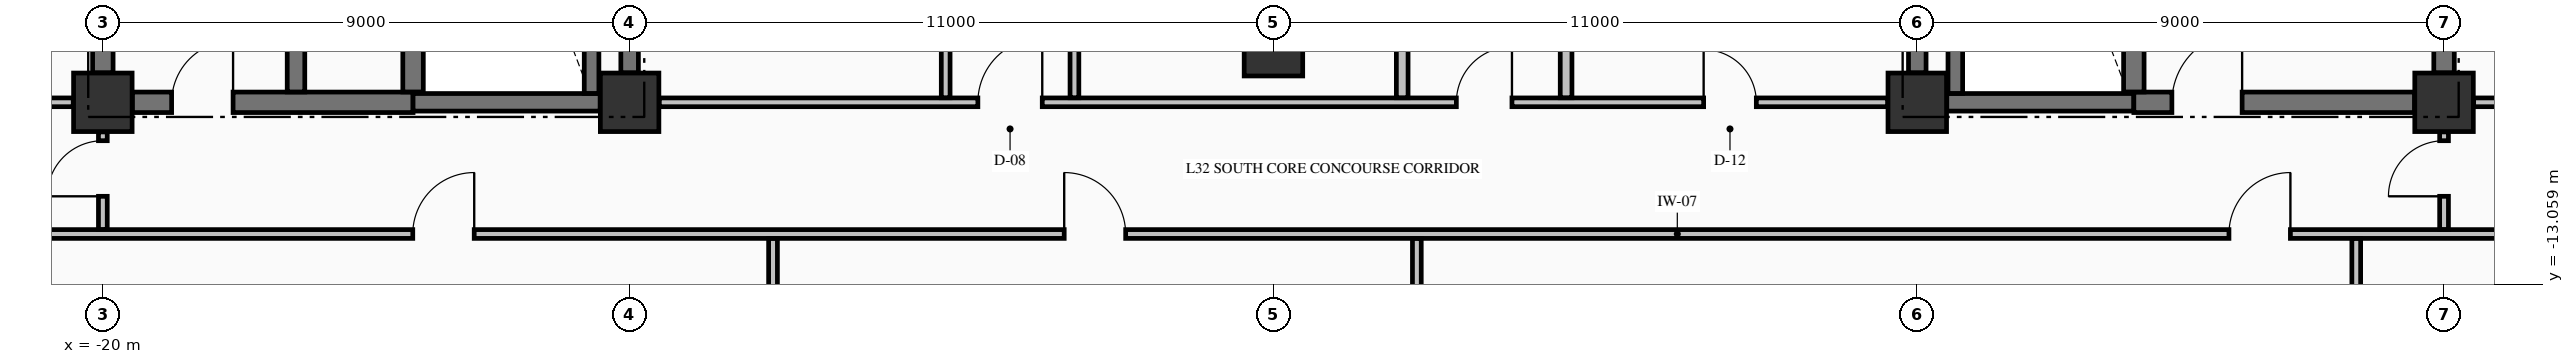
"""IFC4 building model, lengths in metres.
Left out: names, types, materials, properties, quantities, classifications, styles, units other than length and angle.
Written with IfcOpenShell. Run it as: python <this file> out.ifc"""

import sys

from ifc_helpers import new_model, si_unit, direction, frame, frame_2d, origin, origin_2d, place, context, subcontext, project, spatial, rectangle, extrude, element, fill, save


model = new_model("IFC4")
c1 = context("Model", 3, precision=1e-05, world=origin(), true_north=direction((0.0, 1.0)))
c2 = subcontext(c1, "Body", "Model", "MODEL_VIEW")
j1 = project(units=[si_unit("LENGTHUNIT", "METRE"), si_unit("PLANEANGLEUNIT", "RADIAN")], contexts=[c1])
p1 = place(None, origin())
s1 = spatial("IfcSite", under=j1, at=p1, CompositionType="ELEMENT")
p2 = place(p1, origin())
s2 = spatial("IfcBuilding", under=s1, at=p2, CompositionType="ELEMENT")
p3 = place(p2, frame((0.0, 0.0, 128.49)))
s3 = spatial("IfcBuildingStorey", under=s2, at=p3, CompositionType="ELEMENT", Elevation=128.49)
for number, where, z_axis, x_axis in (
    (1, (-20.0, -9.95, -0.25), (0.0, 0.0, 1.0), (1.0, 0.0, 0.0)),
    (2, (-11.0, -9.95, -0.25), (0.0, 0.0, 1.0), (1.0, 0.0, 0.0)),
    (3, (11.0, -9.95, -0.25), (0.0, 0.0, 1.0), (1.0, 0.0, 0.0)),
    (4, (20.0, -9.95, -0.25), (0.0, 0.0, 1.0), (1.0, 0.0, 0.0)),
    (5, (0.0, -9.0, -0.25), (0.0, 0.0, 1.0), (1.0, 0.0, 0.0)),
):
    element("IfcColumn", number, at=place(p3, frame(where, z_axis=z_axis, x_axis=x_axis)), inside=s3, PredefinedType="COLUMN", context=c2, shape_type="SweptSolid", body=[
        extrude(rectangle(XDim=1.0, YDim=1.0, at=origin_2d()), origin(), (0.0, 0.0, 1.0), 3.57),
    ])
p4 = place(p3, frame((-19.496, -9.95, 0.0), z_axis=(0.0, 0.0, 1.0), x_axis=(1.0, 0.0, 0.0)))
e6 = element("IfcWall", 6, at=p4, inside=s3, PredefinedType="SHEAR", context=c2, shape_type="SweptSolid", body=[
    extrude(rectangle(XDim=4.796, YDim=0.35, at=frame_2d((2.398, 0.0))), origin(), (0.0, 0.0, 1.0), 3.32),
])
p5 = place(p4, frame((0.671, 0.0, 0.0)))
e7 = element("IfcOpeningElement", 7, at=p5, cuts=e6, PredefinedType="OPENING", context=c2, shape_type="SweptSolid", body=[
    extrude(rectangle(XDim=1.05, YDim=2.15, at=frame_2d((0.525, 1.075))), frame((0.0, 0.185, 0.0), z_axis=(0.0, -1.0, 0.0), x_axis=(1.0, 0.0, 0.0)), (0.0, 0.0, 1.0), 0.37),
])
for number, where, z_axis, x_axis in (
    (8, (-14.7, -9.95, 0.0), (0.0, 0.0, 1.0), (1.0, 0.0, 0.0)),
    (9, (11.504, -9.95, 0.0), (0.0, 0.0, 1.0), (1.0, 0.0, 0.0)),
):
    element("IfcWall", number, at=place(p3, frame(where, z_axis=z_axis, x_axis=x_axis)), inside=s3, PredefinedType="SHEAR", context=c2, shape_type="SweptSolid", body=[
        extrude(rectangle(XDim=3.196, YDim=0.3, at=frame_2d((1.598, 0.0))), origin(), (0.0, 0.0, 1.0), 3.32),
    ])
p6 = place(p3, frame((14.7, -9.95, 0.0), z_axis=(0.0, 0.0, 1.0), x_axis=(1.0, 0.0, 0.0)))
e10 = element("IfcWall", 10, at=p6, inside=s3, PredefinedType="SHEAR", context=c2, shape_type="SweptSolid", body=[
    extrude(rectangle(XDim=4.796, YDim=0.35, at=frame_2d((2.398, 0.0))), origin(), (0.0, 0.0, 1.0), 3.32),
])
p7 = place(p6, frame((0.65, 0.0, 0.0)))
e11 = element("IfcOpeningElement", 11, at=p7, cuts=e10, PredefinedType="OPENING", context=c2, shape_type="SweptSolid", body=[
    extrude(rectangle(XDim=1.2, YDim=2.15, at=frame_2d((0.6, 1.075))), frame((0.0, 0.185, 0.0), z_axis=(0.0, -1.0, 0.0), x_axis=(1.0, 0.0, 0.0)), (0.0, 0.0, 1.0), 0.37),
])
p8 = place(p3, frame((-27.835, -12.2, 0.0), z_axis=(0.0, 0.0, 1.0), x_axis=(1.0, 0.0, 0.0)))
e12 = element("IfcWall", 12, at=p8, inside=s3, PredefinedType="PARTITIONING", context=c2, shape_type="SweptSolid", body=[
    extrude(rectangle(XDim=50.67, YDim=0.15, at=frame_2d((25.335, 0.0))), origin(), (0.0, 0.0, 1.0), 3.32),
])
p9 = place(p8, frame((13.13, 0.0, 0.0)))
e13 = element("IfcOpeningElement", 13, at=p9, cuts=e12, PredefinedType="OPENING", context=c2, shape_type="SweptSolid", body=[
    extrude(rectangle(XDim=1.05, YDim=2.15, at=frame_2d((0.525, 1.075))), frame((0.0, 0.085, 0.0), z_axis=(0.0, -1.0, 0.0), x_axis=(1.0, 0.0, 0.0)), (0.0, 0.0, 1.0), 0.17),
])
p10 = place(p8, frame((24.26, 0.0, 0.0)))
e14 = element("IfcOpeningElement", 14, at=p10, cuts=e12, PredefinedType="OPENING", context=c2, shape_type="SweptSolid", body=[
    extrude(rectangle(XDim=1.05, YDim=2.15, at=frame_2d((0.525, 1.075))), frame((0.0, 0.085, 0.0), z_axis=(0.0, -1.0, 0.0), x_axis=(1.0, 0.0, 0.0)), (0.0, 0.0, 1.0), 0.17),
])
p11 = place(p8, frame((44.16, 0.0, 0.0)))
e15 = element("IfcOpeningElement", 15, at=p11, cuts=e12, PredefinedType="OPENING", context=c2, shape_type="SweptSolid", body=[
    extrude(rectangle(XDim=1.05, YDim=2.15, at=frame_2d((0.525, 1.075))), frame((0.0, 0.085, 0.0), z_axis=(0.0, -1.0, 0.0), x_axis=(1.0, 0.0, 0.0)), (0.0, 0.0, 1.0), 0.17),
])
p12 = place(p3, frame((-27.835, -9.95, 0.0), z_axis=(0.0, 0.0, 1.0), x_axis=(1.0, 0.0, 0.0)))
e16 = element("IfcWall", 16, at=p12, inside=s3, PredefinedType="PARTITIONING", context=c2, shape_type="SweptSolid", body=[
    extrude(rectangle(XDim=7.329, YDim=0.15, at=frame_2d((3.665, 0.0))), origin(), (0.0, 0.0, 1.0), 3.32),
])
p13 = place(p12, frame((3.36, 0.0, 0.0)))
e17 = element("IfcOpeningElement", 17, at=p13, cuts=e16, PredefinedType="OPENING", context=c2, shape_type="SweptSolid", body=[
    extrude(rectangle(XDim=0.95, YDim=2.15, at=frame_2d((0.475, 1.075))), frame((0.0, 0.085, 0.0), z_axis=(0.0, -1.0, 0.0), x_axis=(1.0, 0.0, 0.0)), (0.0, 0.0, 1.0), 0.17),
])
p14 = place(p3, frame((-10.494, -9.95, 0.0), z_axis=(0.0, 0.0, 1.0), x_axis=(1.0, 0.0, 0.0)))
e18 = element("IfcWall", 18, at=p14, inside=s3, PredefinedType="PARTITIONING", context=c2, shape_type="SweptSolid", body=[
    extrude(rectangle(XDim=20.988, YDim=0.15, at=frame_2d((10.494, 0.0))), origin(), (0.0, 0.0, 1.0), 3.32),
])
p15 = place(p14, frame((5.444, 0.0, 0.0)))
e19 = element("IfcOpeningElement", 19, at=p15, cuts=e18, PredefinedType="OPENING", context=c2, shape_type="SweptSolid", body=[
    extrude(rectangle(XDim=1.1, YDim=2.15, at=frame_2d((0.55, 1.075))), frame((0.0, 0.085, 0.0), z_axis=(0.0, -1.0, 0.0), x_axis=(1.0, 0.0, 0.0)), (0.0, 0.0, 1.0), 0.17),
])
p16 = place(p14, frame((13.619, 0.0, 0.0)))
e20 = element("IfcOpeningElement", 20, at=p16, cuts=e18, PredefinedType="OPENING", context=c2, shape_type="SweptSolid", body=[
    extrude(rectangle(XDim=0.95, YDim=2.15, at=frame_2d((0.475, 1.075))), frame((0.0, 0.085, 0.0), z_axis=(0.0, -1.0, 0.0), x_axis=(1.0, 0.0, 0.0)), (0.0, 0.0, 1.0), 0.17),
])
p17 = place(p14, frame((17.844, 0.0, 0.0)))
e21 = element("IfcOpeningElement", 21, at=p17, cuts=e18, PredefinedType="OPENING", context=c2, shape_type="SweptSolid", body=[
    extrude(rectangle(XDim=0.9, YDim=2.15, at=frame_2d((0.45, 1.075))), frame((0.0, 0.085, 0.0), z_axis=(0.0, -1.0, 0.0), x_axis=(1.0, 0.0, 0.0)), (0.0, 0.0, 1.0), 0.17),
])
p18 = place(p3, frame((20.506, -9.95, 0.0), z_axis=(0.0, 0.0, 1.0), x_axis=(1.0, 0.0, 0.0)))
e22 = element("IfcWall", 22, at=p18, inside=s3, PredefinedType="PARTITIONING", context=c2, shape_type="SweptSolid", body=[
    extrude(rectangle(XDim=2.329, YDim=0.15, at=frame_2d((1.165, 0.0))), origin(), (0.0, 0.0, 1.0), 3.32),
])
p19 = place(p18, frame((0.494, 0.0, 0.0)))
e23 = element("IfcOpeningElement", 23, at=p19, cuts=e22, PredefinedType="OPENING", context=c2, shape_type="SweptSolid", body=[
    extrude(rectangle(XDim=1.0, YDim=2.15, at=frame_2d((0.5, 1.075))), frame((0.0, 0.085, 0.0), z_axis=(0.0, -1.0, 0.0), x_axis=(1.0, 0.0, 0.0)), (0.0, 0.0, 1.0), 0.17),
])
p20 = place(p3, frame((-20.0, -9.446, 0.0), z_axis=(0.0, 0.0, 1.0), x_axis=(0.0, 1.0, 0.0)))
e24 = element("IfcWall", 24, at=p20, inside=s3, PredefinedType="SHEAR", context=c2, shape_type="SweptSolid", body=[
    extrude(rectangle(XDim=8.942, YDim=0.35, at=frame_2d((4.471, 0.0))), origin(), (0.0, 0.0, 1.0), 3.32),
])
p21 = place(p3, frame((-16.7, -9.773, 0.0), z_axis=(0.0, 0.0, 1.0), x_axis=(0.0, 1.0, 0.0)))
e25 = element("IfcWall", 25, at=p21, inside=s3, PredefinedType="SHEAR", context=c2, shape_type="SweptSolid", body=[
    extrude(rectangle(XDim=9.371, YDim=0.3, at=frame_2d((4.686, 0.0))), origin(), (0.0, 0.0, 1.0), 3.32),
])
p22 = place(p3, frame((-14.7, -9.773, 0.0), z_axis=(0.0, 0.0, 1.0), x_axis=(0.0, 1.0, 0.0)))
e26 = element("IfcWall", 26, at=p22, inside=s3, PredefinedType="SHEAR", context=c2, shape_type="SweptSolid", body=[
    extrude(rectangle(XDim=9.371, YDim=0.35, at=frame_2d((4.686, 0.0))), origin(), (0.0, 0.0, 1.0), 3.32),
])
p23 = place(p3, frame((-11.65, -9.798, 0.0), z_axis=(0.0, 0.0, 1.0), x_axis=(0.0, 1.0, 0.0)))
e27 = element("IfcWall", 27, at=p23, inside=s3, PredefinedType="SOLIDWALL", context=c2, shape_type="SweptSolid", body=[
    extrude(rectangle(XDim=9.396, YDim=0.25, at=frame_2d((4.698, 0.0))), origin(), (0.0, 0.0, 1.0), 3.32),
])
for number, where, z_axis, x_axis in (
    (28, (-11.0, -9.446, 0.0), (0.0, 0.0, 1.0), (0.0, 1.0, 0.0)),
    (29, (11.0, -9.446, 0.0), (0.0, 0.0, 1.0), (0.0, 1.0, 0.0)),
):
    element("IfcWall", number, at=place(p3, frame(where, z_axis=z_axis, x_axis=x_axis)), inside=s3, PredefinedType="SHEAR", context=c2, shape_type="SweptSolid", body=[
        extrude(rectangle(XDim=8.942, YDim=0.3, at=frame_2d((4.471, 0.0))), origin(), (0.0, 0.0, 1.0), 3.32),
    ])
p24 = place(p3, frame((11.65, -9.798, 0.0), z_axis=(0.0, 0.0, 1.0), x_axis=(0.0, 1.0, 0.0)))
e30 = element("IfcWall", 30, at=p24, inside=s3, PredefinedType="SOLIDWALL", context=c2, shape_type="SweptSolid", body=[
    extrude(rectangle(XDim=9.396, YDim=0.25, at=frame_2d((4.698, 0.0))), origin(), (0.0, 0.0, 1.0), 3.32),
])
p25 = place(p3, frame((14.7, -9.773, 0.0), z_axis=(0.0, 0.0, 1.0), x_axis=(0.0, 1.0, 0.0)))
e31 = element("IfcWall", 31, at=p25, inside=s3, PredefinedType="SHEAR", context=c2, shape_type="SweptSolid", body=[
    extrude(rectangle(XDim=9.371, YDim=0.35, at=frame_2d((4.686, 0.0))), origin(), (0.0, 0.0, 1.0), 3.32),
])
p26 = place(p3, frame((20.0, -9.446, 0.0), z_axis=(0.0, 0.0, 1.0), x_axis=(0.0, 1.0, 0.0)))
e32 = element("IfcWall", 32, at=p26, inside=s3, PredefinedType="SHEAR", context=c2, shape_type="SweptSolid", body=[
    extrude(rectangle(XDim=2.269, YDim=0.35, at=frame_2d((1.135, 0.0))), origin(), (0.0, 0.0, 1.0), 3.32),
])
p27 = place(p3, frame((-20.0, -12.122, 0.0), z_axis=(0.0, 0.0, 1.0), x_axis=(0.0, 1.0, 0.0)))
e33 = element("IfcWall", 33, at=p27, inside=s3, PredefinedType="PARTITIONING", context=c2, shape_type="SweptSolid", body=[
    extrude(rectangle(XDim=1.666, YDim=0.15, at=frame_2d((0.833, 0.0))), origin(), (0.0, 0.0, 1.0), 2.81),
])
p28 = place(p27, frame((0.566, 0.0, 0.0)))
e34 = element("IfcOpeningElement", 34, at=p28, cuts=e33, PredefinedType="OPENING", context=c2, shape_type="SweptSolid", body=[
    extrude(rectangle(XDim=0.95, YDim=2.15, at=frame_2d((0.475, 1.075))), frame((0.0, 0.085, 0.0), z_axis=(0.0, -1.0, 0.0), x_axis=(1.0, 0.0, 0.0)), (0.0, 0.0, 1.0), 0.17),
])
p29 = place(p3, frame((-8.55, -25.335, 0.0), z_axis=(0.0, 0.0, 1.0), x_axis=(0.0, 1.0, 0.0)))
e35 = element("IfcWall", 35, at=p29, inside=s3, PredefinedType="PARTITIONING", context=c2, shape_type="SweptSolid", body=[
    extrude(rectangle(XDim=13.057, YDim=0.15, at=frame_2d((6.528, 0.0))), origin(), (0.0, 0.0, 1.0), 3.32),
])
p30 = place(p3, frame((-5.6, -9.872, 0.0), z_axis=(0.0, 0.0, 1.0), x_axis=(0.0, 1.0, 0.0)))
e36 = element("IfcWall", 36, at=p30, inside=s3, PredefinedType="PARTITIONING", context=c2, shape_type="SweptSolid", body=[
    extrude(rectangle(XDim=9.544, YDim=0.15, at=frame_2d((4.772, 0.0))), origin(), (0.0, 0.0, 1.0), 3.32),
])
p31 = place(p3, frame((-3.4, -9.872, 0.0), z_axis=(0.0, 0.0, 1.0), x_axis=(0.0, 1.0, 0.0)))
e37 = element("IfcWall", 37, at=p31, inside=s3, PredefinedType="PARTITIONING", context=c2, shape_type="SweptSolid", body=[
    extrude(rectangle(XDim=5.519, YDim=0.15, at=frame_2d((2.76, 0.0))), origin(), (0.0, 0.0, 1.0), 3.32),
])
p32 = place(p31, frame((2.597, 0.0, 0.0)))
e38 = element("IfcOpeningElement", 38, at=p32, cuts=e37, PredefinedType="OPENING", context=c2, shape_type="SweptSolid", body=[
    extrude(rectangle(XDim=0.95, YDim=2.15, at=frame_2d((0.475, 1.075))), frame((0.0, 0.085, 0.0), z_axis=(0.0, -1.0, 0.0), x_axis=(1.0, 0.0, 0.0)), (0.0, 0.0, 1.0), 0.17),
])
p33 = place(p3, frame((2.2, -9.872, 0.0), z_axis=(0.0, 0.0, 1.0), x_axis=(0.0, 1.0, 0.0)))
e39 = element("IfcWall", 39, at=p33, inside=s3, PredefinedType="PARTITIONING", context=c2, shape_type="SweptSolid", body=[
    extrude(rectangle(XDim=5.519, YDim=0.2, at=frame_2d((2.76, 0.0))), origin(), (0.0, 0.0, 1.0), 3.32),
])
p34 = place(p3, frame((2.45, -25.335, 0.0), z_axis=(0.0, 0.0, 1.0), x_axis=(0.0, 1.0, 0.0)))
e40 = element("IfcWall", 40, at=p34, inside=s3, PredefinedType="PARTITIONING", context=c2, shape_type="SweptSolid", body=[
    extrude(rectangle(XDim=13.057, YDim=0.15, at=frame_2d((6.528, 0.0))), origin(), (0.0, 0.0, 1.0), 3.32),
])
p35 = place(p3, frame((5.0, -9.872, 0.0), z_axis=(0.0, 0.0, 1.0), x_axis=(0.0, 1.0, 0.0)))
e41 = element("IfcWall", 41, at=p35, inside=s3, PredefinedType="PARTITIONING", context=c2, shape_type="SweptSolid", body=[
    extrude(rectangle(XDim=5.519, YDim=0.2, at=frame_2d((2.76, 0.0))), origin(), (0.0, 0.0, 1.0), 3.32),
])
p36 = place(p3, frame((18.5, -20.394, 0.0), z_axis=(0.0, 0.0, 1.0), x_axis=(0.0, 1.0, 0.0)))
e42 = element("IfcWall", 42, at=p36, inside=s3, PredefinedType="PARTITIONING", context=c2, shape_type="SweptSolid", body=[
    extrude(rectangle(XDim=8.116, YDim=0.15, at=frame_2d((4.058, 0.0))), origin(), (0.0, 0.0, 1.0), 3.32),
])
p37 = place(p3, frame((20.0, -12.122, 0.0), z_axis=(0.0, 0.0, 1.0), x_axis=(0.0, 1.0, 0.0)))
e43 = element("IfcWall", 43, at=p37, inside=s3, PredefinedType="PARTITIONING", context=c2, shape_type="SweptSolid", body=[
    extrude(rectangle(XDim=1.666, YDim=0.15, at=frame_2d((0.833, 0.0))), origin(), (0.0, 0.0, 1.0), 2.81),
])
p38 = place(p37, frame((0.566, 0.0, 0.0)))
e44 = element("IfcOpeningElement", 44, at=p38, cuts=e43, PredefinedType="OPENING", context=c2, shape_type="SweptSolid", body=[
    extrude(rectangle(XDim=0.95, YDim=2.15, at=frame_2d((0.475, 1.075))), frame((0.0, 0.085, 0.0), z_axis=(0.0, -1.0, 0.0), x_axis=(1.0, 0.0, 0.0)), (0.0, 0.0, 1.0), 0.17),
])
p39 = place(p5, origin())
e45 = element("IfcDoor", 45, at=p39, inside=s3, OperationType="SINGLE_SWING_RIGHT", PredefinedType="DOOR", context=c2, shape_type="SweptSolid", body=[
    extrude(rectangle(XDim=1.05, YDim=2.15, at=frame_2d((0.525, 1.075))), frame((0.0, 0.025, 0.0), z_axis=(0.0, -1.0, 0.0), x_axis=(1.0, 0.0, 0.0)), (0.0, 0.0, 1.0), 0.05),
])
fill(e7, e45)
p40 = place(p7, origin())
e46 = element("IfcDoor", 46, at=p40, inside=s3, OperationType="SINGLE_SWING_RIGHT", PredefinedType="DOOR", context=c2, shape_type="SweptSolid", body=[
    extrude(rectangle(XDim=1.2, YDim=2.15, at=frame_2d((0.6, 1.075))), frame((0.0, 0.025, 0.0), z_axis=(0.0, -1.0, 0.0), x_axis=(1.0, 0.0, 0.0)), (0.0, 0.0, 1.0), 0.05),
])
fill(e11, e46)
p41 = place(p15, origin())
e47 = element("IfcDoor", 47, at=p41, inside=s3, OperationType="SINGLE_SWING_RIGHT", PredefinedType="DOOR", context=c2, shape_type="SweptSolid", body=[
    extrude(rectangle(XDim=1.1, YDim=2.15, at=frame_2d((0.55, 1.075))), frame((0.0, 0.025, 0.0), z_axis=(0.0, -1.0, 0.0), x_axis=(1.0, 0.0, 0.0)), (0.0, 0.0, 1.0), 0.05),
])
fill(e19, e47)
p42 = place(p9, origin())
e48 = element("IfcDoor", 48, at=p42, inside=s3, OperationType="SINGLE_SWING_RIGHT", PredefinedType="DOOR", context=c2, shape_type="SweptSolid", body=[
    extrude(rectangle(XDim=1.05, YDim=2.15, at=frame_2d((0.525, 1.075))), frame((0.0, 0.025, 0.0), z_axis=(0.0, -1.0, 0.0), x_axis=(1.0, 0.0, 0.0)), (0.0, 0.0, 1.0), 0.05),
])
fill(e13, e48)
p43 = place(p10, origin())
e49 = element("IfcDoor", 49, at=p43, inside=s3, OperationType="SINGLE_SWING_LEFT", PredefinedType="DOOR", context=c2, shape_type="SweptSolid", body=[
    extrude(rectangle(XDim=1.05, YDim=2.15, at=frame_2d((0.525, 1.075))), frame((0.0, 0.025, 0.0), z_axis=(0.0, -1.0, 0.0), x_axis=(1.0, 0.0, 0.0)), (0.0, 0.0, 1.0), 0.05),
])
fill(e14, e49)
p44 = place(p11, origin())
e50 = element("IfcDoor", 50, at=p44, inside=s3, OperationType="SINGLE_SWING_RIGHT", PredefinedType="DOOR", context=c2, shape_type="SweptSolid", body=[
    extrude(rectangle(XDim=1.05, YDim=2.15, at=frame_2d((0.525, 1.075))), frame((0.0, 0.025, 0.0), z_axis=(0.0, -1.0, 0.0), x_axis=(1.0, 0.0, 0.0)), (0.0, 0.0, 1.0), 0.05),
])
fill(e15, e50)
p45 = place(p16, origin())
e51 = element("IfcDoor", 51, at=p45, inside=s3, OperationType="SINGLE_SWING_RIGHT", PredefinedType="DOOR", context=c2, shape_type="SweptSolid", body=[
    extrude(rectangle(XDim=0.95, YDim=2.15, at=frame_2d((0.475, 1.075))), frame((0.0, 0.025, 0.0), z_axis=(0.0, -1.0, 0.0), x_axis=(1.0, 0.0, 0.0)), (0.0, 0.0, 1.0), 0.05),
])
fill(e20, e51)
p46 = place(p17, origin())
e52 = element("IfcDoor", 52, at=p46, inside=s3, OperationType="SINGLE_SWING_LEFT", PredefinedType="DOOR", context=c2, shape_type="SweptSolid", body=[
    extrude(rectangle(XDim=0.9, YDim=2.15, at=frame_2d((0.45, 1.075))), frame((0.0, 0.025, 0.0), z_axis=(0.0, -1.0, 0.0), x_axis=(1.0, 0.0, 0.0)), (0.0, 0.0, 1.0), 0.05),
])
fill(e21, e52)
p47 = place(p28, origin())
e53 = element("IfcDoor", 53, at=p47, inside=s3, OperationType="SINGLE_SWING_LEFT", PredefinedType="DOOR", context=c2, shape_type="SweptSolid", body=[
    extrude(rectangle(XDim=0.95, YDim=2.15, at=frame_2d((0.475, 1.075))), frame((0.0, 0.025, 0.0), z_axis=(0.0, -1.0, 0.0), x_axis=(1.0, 0.0, 0.0)), (0.0, 0.0, 1.0), 0.05),
])
fill(e34, e53)
p48 = place(p38, origin())
e54 = element("IfcDoor", 54, at=p48, inside=s3, OperationType="SINGLE_SWING_LEFT", PredefinedType="DOOR", context=c2, shape_type="SweptSolid", body=[
    extrude(rectangle(XDim=0.95, YDim=2.15, at=frame_2d((0.475, 1.075))), frame((0.0, 0.025, 0.0), z_axis=(0.0, -1.0, 0.0), x_axis=(1.0, 0.0, 0.0)), (0.0, 0.0, 1.0), 0.05),
])
fill(e44, e54)
save(model, sys.argv[1])
